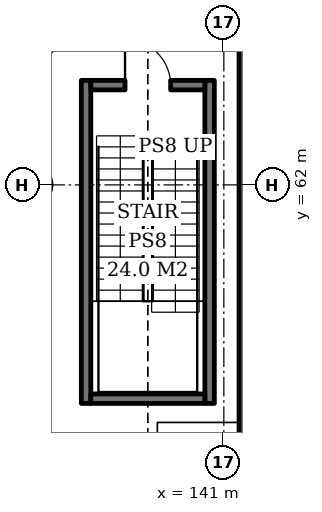
"""IFC4 building model, lengths in metres.
Left out: names, types, materials, properties, quantities, classifications, styles, units other than length and angle.
Written with IfcOpenShell. Run it as: python <this file> out.ifc"""

import sys

from ifc_helpers import new_model, si_unit, direction, frame, frame_2d, origin, place, context, subcontext, project, spatial, rectangle, extrude, element, fill, save


model = new_model("IFC4")
c1 = context("Model", 3, precision=1e-05, world=origin(), true_north=direction((0.0, 1.0)))
c2 = subcontext(c1, "Body", "Model", "MODEL_VIEW")
j1 = project(units=[si_unit("LENGTHUNIT", "METRE"), si_unit("PLANEANGLEUNIT", "RADIAN")], contexts=[c1])
p1 = place(None, origin())
s1 = spatial("IfcSite", under=j1, at=p1, CompositionType="ELEMENT")
p2 = place(p1, origin())
s2 = spatial("IfcBuilding", under=s1, at=p2, CompositionType="ELEMENT")
p3 = place(p2, frame((0.0, 0.0, -10.0)))
s3 = spatial("IfcBuildingStorey", under=s2, at=p3, CompositionType="ELEMENT", Elevation=-10.0)
p4 = place(p3, frame((141.7, 5.6, -0.5), z_axis=(0.0, 0.0, 1.0), x_axis=(0.0, 1.0, 0.0)))
e1 = element("IfcWall", 1, at=p4, inside=s3, PredefinedType="USERDEFINED", context=c2, shape_type="SweptSolid", body=[
    extrude(rectangle(XDim=88.8, YDim=0.6, at=frame_2d((44.4, 0.0))), origin(), (0.0, 0.0, 1.0), 5.5),
])
for number, where, z_axis, x_axis in (
    (2, (137.375, 56.25, 0.0), (0.0, 0.0, 1.0), (0.0, 1.0, 0.0)),
    (3, (140.625, 56.25, 0.0), (0.0, 0.0, 1.0), (0.0, 1.0, 0.0)),
):
    element("IfcWall", number, at=place(p3, frame(where, z_axis=z_axis, x_axis=x_axis)), inside=s3, PredefinedType="SOLIDWALL", context=c2, shape_type="SweptSolid", body=[
        extrude(rectangle(XDim=8.5, YDim=0.25, at=frame_2d((4.25, 0.0))), origin(), (0.0, 0.0, 1.0), 4.7),
    ])
p5 = place(p3, frame((137.5, 56.375, 0.0), z_axis=(0.0, 0.0, 1.0), x_axis=(1.0, 0.0, 0.0)))
e4 = element("IfcWall", 4, at=p5, inside=s3, PredefinedType="SOLIDWALL", context=c2, shape_type="SweptSolid", body=[
    extrude(rectangle(XDim=3.0, YDim=0.25, at=frame_2d((1.5, 0.0))), origin(), (0.0, 0.0, 1.0), 4.7),
])
p6 = place(p3, frame((137.5, 64.625, 0.0), z_axis=(0.0, 0.0, 1.0), x_axis=(1.0, 0.0, 0.0)))
e5 = element("IfcWall", 5, at=p6, inside=s3, PredefinedType="SOLIDWALL", context=c2, shape_type="SweptSolid", body=[
    extrude(rectangle(XDim=3.0, YDim=0.25, at=frame_2d((1.5, 0.0))), origin(), (0.0, 0.0, 1.0), 4.7),
])
p7 = place(p6, frame((0.9, 0.0, 0.0)))
e6 = element("IfcOpeningElement", 6, at=p7, cuts=e5, PredefinedType="OPENING", context=c2, shape_type="SweptSolid", body=[
    extrude(rectangle(XDim=1.2, YDim=2.1, at=frame_2d((0.6, 1.05))), frame((0.0, 0.135, 0.0), z_axis=(0.0, -1.0, 0.0), x_axis=(1.0, 0.0, 0.0)), (0.0, 0.0, 1.0), 0.27),
])
p8 = place(p7, origin())
e7 = element("IfcDoor", 7, at=p8, inside=s3, OperationType="SINGLE_SWING_LEFT", PredefinedType="DOOR", context=c2, shape_type="SweptSolid", body=[
    extrude(rectangle(XDim=1.2, YDim=2.1, at=frame_2d((0.6, 1.05))), frame((0.0, 0.025, 0.0), z_axis=(0.0, -1.0, 0.0), x_axis=(1.0, 0.0, 0.0)), (0.0, 0.0, 1.0), 0.05),
])
fill(e6, e7)
save(model, sys.argv[1])
